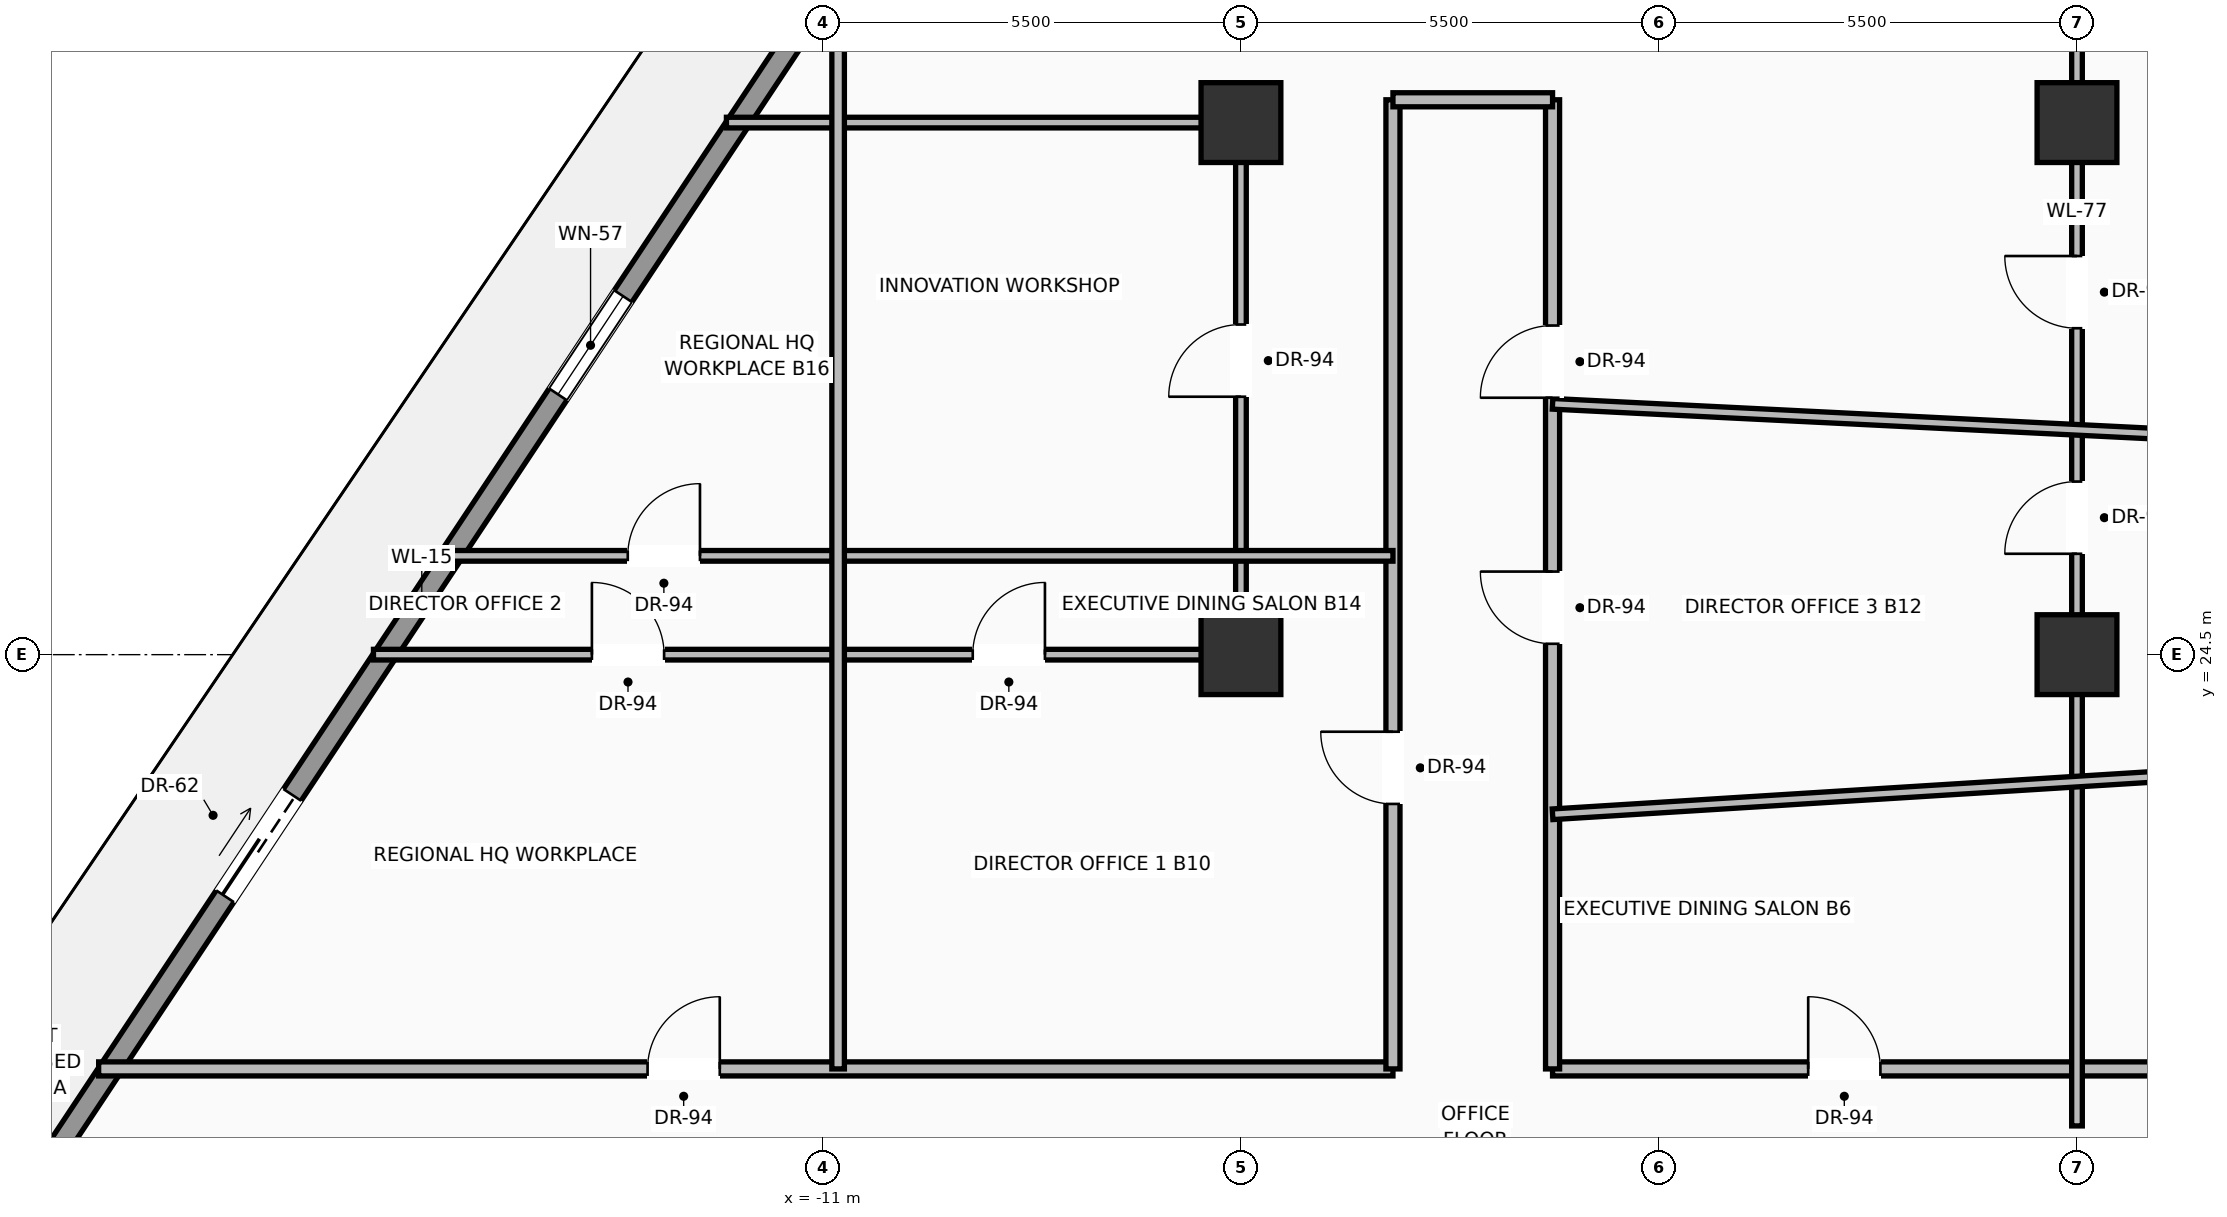
"""IFC4 building model, lengths in metres.
Left out: names, types, materials, properties, quantities, classifications, styles, units other than length and angle.
Written with IfcOpenShell. Run it as: python <this file> out.ifc"""

import sys

from ifc_helpers import new_model, si_unit, direction, frame, frame_2d, origin, origin_2d, place, context, subcontext, project, spatial, rectangle, extrude, source, transform, mapped, element, fill, save


model = new_model("IFC4")
c1 = context("Model", 3, precision=1e-05, world=origin(), true_north=direction((0.0, 1.0)))
c2 = subcontext(c1, "Body", "Model", "MODEL_VIEW")
j1 = project(units=[si_unit("LENGTHUNIT", "METRE"), si_unit("PLANEANGLEUNIT", "RADIAN")], contexts=[c1])
p1 = place(None, origin())
s1 = spatial("IfcSite", under=j1, at=p1, CompositionType="ELEMENT")
p2 = place(p1, origin())
s2 = spatial("IfcBuilding", under=s1, at=p2, CompositionType="ELEMENT")
p3 = place(p2, frame((0.0, 0.0, 117.3)))
s3 = spatial("IfcBuildingStorey", under=s2, at=p3, CompositionType="ELEMENT", Elevation=117.3)
m1 = source(origin(), c2, "Body", "SweptSolid", [
    extrude(rectangle(XDim=1.05, YDim=1.05, at=origin_2d()), origin(), (0.0, 0.0, 1.0), 3.7),
])
for number, where, z_axis, x_axis in (
    (1, (-5.5, 24.5, 0.0), (0.0, 0.0, 1.0), (1.0, 0.0, 0.0)),
    (2, (5.5, 24.5, 0.0), (0.0, 0.0, 1.0), (1.0, 0.0, 0.0)),
    (3, (-5.5, 31.5, 0.0), (0.0, 0.0, 1.0), (1.0, 0.0, 0.0)),
    (4, (5.5, 31.5, 0.0), (0.0, 0.0, 1.0), (1.0, 0.0, 0.0)),
):
    element("IfcColumn", number, at=place(p3, frame(where, z_axis=z_axis, x_axis=x_axis)), inside=s3, PredefinedType="COLUMN", context=c2, shape_type="MappedRepresentation", body=[
        mapped(m1, transform((0.0, 0.0, 0.0), scale=1.0)),
    ])
p4 = place(p3, frame((-21.256, 17.72, 0.0), z_axis=(0.0, 0.0, 1.0), x_axis=(0.552837339674, 0.833289191015, 0.0)))
e5 = element("IfcWall", 5, at=p4, inside=s3, PredefinedType="SOLIDWALL", context=c2, shape_type="SweptSolid", body=[
    extrude(rectangle(XDim=18.009, YDim=0.28, at=frame_2d((9.004, 0.0))), origin(), (0.0, 0.0, 1.0), 3.0),
])
p5 = place(p4, frame((4.322, 0.0, 0.0)))
e6 = element("IfcOpeningElement", 6, at=p5, cuts=e5, PredefinedType="OPENING", context=c2, shape_type="SweptSolid", body=[
    extrude(rectangle(XDim=1.6, YDim=2.35, at=frame_2d((0.8, 1.175))), frame((0.0, 0.15, 0.0), z_axis=(0.0, -1.0, 0.0), x_axis=(1.0, 0.0, 0.0)), (0.0, 0.0, 1.0), 0.3),
])
p6 = place(p4, frame((12.246, 0.0, 0.9)))
e7 = element("IfcOpeningElement", 7, at=p6, cuts=e5, PredefinedType="OPENING", context=c2, shape_type="SweptSolid", body=[
    extrude(rectangle(XDim=1.55, YDim=1.85, at=frame_2d((0.775, 0.925))), frame((0.0, 0.15, 0.0), z_axis=(0.0, -1.0, 0.0), x_axis=(1.0, 0.0, 0.0)), (0.0, 0.0, 1.0), 0.3),
])
p7 = place(p3, frame((-20.529, 19.05, 0.0), z_axis=(0.0, 0.0, 1.0), x_axis=(1.0, 0.0, 0.0)))
e8 = element("IfcWall", 8, at=p7, inside=s3, PredefinedType="PARTITIONING", context=c2, shape_type="SweptSolid", body=[
    extrude(rectangle(XDim=17.029, YDim=0.185, at=frame_2d((8.515, 0.0))), origin(), (0.0, 0.0, 1.0), 2.717),
])
p8 = place(p7, frame((7.222, 0.0, 0.0)))
e9 = element("IfcOpeningElement", 9, at=p8, cuts=e8, PredefinedType="OPENING", context=c2, shape_type="SweptSolid", body=[
    extrude(rectangle(XDim=0.95, YDim=2.2, at=frame_2d((0.475, 1.1))), frame((0.0, 0.103, 0.0), z_axis=(0.0, -1.0, 0.0), x_axis=(1.0, 0.0, 0.0)), (0.0, 0.0, 1.0), 0.205),
])
p9 = place(p3, frame((-1.4, 19.05, 0.0), z_axis=(0.0, 0.0, 1.0), x_axis=(1.0, 0.0, 0.0)))
e10 = element("IfcWall", 10, at=p9, inside=s3, PredefinedType="PARTITIONING", context=c2, shape_type="SweptSolid", body=[
    extrude(rectangle(XDim=22.357, YDim=0.185, at=frame_2d((11.179, 0.0))), origin(), (0.0, 0.0, 1.0), 2.717),
])
p10 = place(p9, frame((12.715, 0.0, 0.0)))
e11 = element("IfcOpeningElement", 11, at=p10, cuts=e10, PredefinedType="OPENING", context=c2, shape_type="SweptSolid", body=[
    extrude(rectangle(XDim=0.95, YDim=2.2, at=frame_2d((0.475, 1.1))), frame((0.0, 0.103, 0.0), z_axis=(0.0, -1.0, 0.0), x_axis=(1.0, 0.0, 0.0)), (0.0, 0.0, 1.0), 0.205),
])
p11 = place(p9, frame((3.363, 0.0, 0.0)))
e12 = element("IfcOpeningElement", 12, at=p11, cuts=e10, PredefinedType="OPENING", context=c2, shape_type="SweptSolid", body=[
    extrude(rectangle(XDim=0.95, YDim=2.2, at=frame_2d((0.475, 1.1))), frame((0.0, 0.103, 0.0), z_axis=(0.0, -1.0, 0.0), x_axis=(1.0, 0.0, 0.0)), (0.0, 0.0, 1.0), 0.205),
])
p12 = place(p9, frame((9.021, 0.0, 0.0)))
e13 = element("IfcOpeningElement", 13, at=p12, cuts=e10, PredefinedType="OPENING", context=c2, shape_type="SweptSolid", body=[
    extrude(rectangle(XDim=0.95, YDim=2.2, at=frame_2d((0.475, 1.1))), frame((0.0, 0.103, 0.0), z_axis=(0.0, -1.0, 0.0), x_axis=(1.0, 0.0, 0.0)), (0.0, 0.0, 1.0), 0.205),
])
p13 = place(p3, frame((-3.5, 19.05, 0.0), z_axis=(0.0, 0.0, 1.0), x_axis=(0.0, 1.0, 0.0)))
e14 = element("IfcWall", 14, at=p13, inside=s3, PredefinedType="PARTITIONING", context=c2, shape_type="SweptSolid", body=[
    extrude(rectangle(XDim=12.75, YDim=0.185, at=frame_2d((6.375, 0.0))), origin(), (0.0, 0.0, 1.0), 2.717),
])
p14 = place(p13, frame((3.486, 0.0, 0.0)))
e15 = element("IfcOpeningElement", 15, at=p14, cuts=e14, PredefinedType="OPENING", context=c2, shape_type="SweptSolid", body=[
    extrude(rectangle(XDim=0.95, YDim=2.2, at=frame_2d((0.475, 1.1))), frame((0.0, 0.103, 0.0), z_axis=(0.0, -1.0, 0.0), x_axis=(1.0, 0.0, 0.0)), (0.0, 0.0, 1.0), 0.205),
])
p15 = place(p3, frame((-1.4, 19.05, 0.0), z_axis=(0.0, 0.0, 1.0), x_axis=(0.0, 1.0, 0.0)))
e16 = element("IfcWall", 16, at=p15, inside=s3, PredefinedType="PARTITIONING", context=c2, shape_type="SweptSolid", body=[
    extrude(rectangle(XDim=12.75, YDim=0.185, at=frame_2d((6.375, 0.0))), origin(), (0.0, 0.0, 1.0), 2.717),
])
p16 = place(p15, frame((8.83, 0.0, 0.0)))
e17 = element("IfcOpeningElement", 17, at=p16, cuts=e16, PredefinedType="OPENING", context=c2, shape_type="SweptSolid", body=[
    extrude(rectangle(XDim=0.95, YDim=2.2, at=frame_2d((0.475, 1.1))), frame((0.0, 0.103, 0.0), z_axis=(0.0, -1.0, 0.0), x_axis=(1.0, 0.0, 0.0)), (0.0, 0.0, 1.0), 0.205),
])
p17 = place(p15, frame((5.593, 0.0, 0.0)))
e18 = element("IfcOpeningElement", 18, at=p17, cuts=e16, PredefinedType="OPENING", context=c2, shape_type="SweptSolid", body=[
    extrude(rectangle(XDim=0.95, YDim=2.2, at=frame_2d((0.475, 1.1))), frame((0.0, 0.103, 0.0), z_axis=(0.0, -1.0, 0.0), x_axis=(1.0, 0.0, 0.0)), (0.0, 0.0, 1.0), 0.205),
])
p18 = place(p3, frame((-3.5, 31.8, 0.0), z_axis=(0.0, 0.0, 1.0), x_axis=(1.0, 0.0, 0.0)))
e19 = element("IfcWall", 19, at=p18, inside=s3, PredefinedType="PARTITIONING", context=c2, shape_type="SweptSolid", body=[
    extrude(rectangle(XDim=2.1, YDim=0.185, at=frame_2d((1.05, 0.0))), origin(), (0.0, 0.0, 1.0), 2.717),
])
p19 = place(p3, frame((5.5, 18.3, 0.0), z_axis=(0.0, 0.0, 1.0), x_axis=(0.0, 1.0, 0.0)))
e20 = element("IfcWall", 20, at=p19, inside=s3, PredefinedType="PARTITIONING", context=c2, shape_type="SweptSolid", body=[
    extrude(rectangle(XDim=24.043, YDim=0.14, at=frame_2d((12.022, 0.0))), origin(), (0.0, 0.0, 1.0), 2.717),
])
p20 = place(p19, frame((10.494, 0.0, 0.0)))
e21 = element("IfcOpeningElement", 21, at=p20, cuts=e20, PredefinedType="OPENING", context=c2, shape_type="SweptSolid", body=[
    extrude(rectangle(XDim=0.95, YDim=2.2, at=frame_2d((0.475, 1.1))), frame((0.0, 0.08, 0.0), z_axis=(0.0, -1.0, 0.0), x_axis=(1.0, 0.0, 0.0)), (0.0, 0.0, 1.0), 0.16),
])
p21 = place(p19, frame((18.555, 0.0, 0.0)))
e22 = element("IfcOpeningElement", 22, at=p21, cuts=e20, PredefinedType="OPENING", context=c2, shape_type="SweptSolid", body=[
    extrude(rectangle(XDim=0.95, YDim=2.2, at=frame_2d((0.475, 1.1))), frame((0.0, 0.08, 0.0), z_axis=(0.0, -1.0, 0.0), x_axis=(1.0, 0.0, 0.0)), (0.0, 0.0, 1.0), 0.16),
])
p22 = place(p19, frame((7.527, 0.0, 0.0)))
e23 = element("IfcOpeningElement", 23, at=p22, cuts=e20, PredefinedType="OPENING", context=c2, shape_type="SweptSolid", body=[
    extrude(rectangle(XDim=0.95, YDim=2.2, at=frame_2d((0.475, 1.1))), frame((0.0, 0.08, 0.0), z_axis=(0.0, -1.0, 0.0), x_axis=(1.0, 0.0, 0.0)), (0.0, 0.0, 1.0), 0.16),
])
p23 = place(p3, frame((-16.914, 24.5, 0.0), z_axis=(0.0, 0.0, 1.0), x_axis=(1.0, 0.0, 0.0)))
e24 = element("IfcWall", 24, at=p23, inside=s3, PredefinedType="PARTITIONING", context=c2, shape_type="SweptSolid", body=[
    extrude(rectangle(XDim=11.414, YDim=0.14, at=frame_2d((5.707, 0.0))), origin(), (0.0, 0.0, 1.0), 2.717),
])
p24 = place(p23, frame((2.874, 0.0, 0.0)))
e25 = element("IfcOpeningElement", 25, at=p24, cuts=e24, PredefinedType="OPENING", context=c2, shape_type="SweptSolid", body=[
    extrude(rectangle(XDim=0.95, YDim=2.2, at=frame_2d((0.475, 1.1))), frame((0.0, 0.08, 0.0), z_axis=(0.0, -1.0, 0.0), x_axis=(1.0, 0.0, 0.0)), (0.0, 0.0, 1.0), 0.16),
])
p25 = place(p23, frame((7.885, 0.0, 0.0)))
e26 = element("IfcOpeningElement", 26, at=p25, cuts=e24, PredefinedType="OPENING", context=c2, shape_type="SweptSolid", body=[
    extrude(rectangle(XDim=0.95, YDim=2.2, at=frame_2d((0.475, 1.1))), frame((0.0, 0.08, 0.0), z_axis=(0.0, -1.0, 0.0), x_axis=(1.0, 0.0, 0.0)), (0.0, 0.0, 1.0), 0.16),
])
p26 = place(p3, frame((-5.5, 24.5, 0.0), z_axis=(0.0, 0.0, 1.0), x_axis=(0.0, 1.0, 0.0)))
e27 = element("IfcWall", 27, at=p26, inside=s3, PredefinedType="PARTITIONING", context=c2, shape_type="SweptSolid", body=[
    extrude(rectangle(XDim=7.0, YDim=0.14, at=frame_2d((3.5, 0.0))), origin(), (0.0, 0.0, 1.0), 2.717),
])
p27 = place(p26, frame((3.393, 0.0, 0.0)))
e28 = element("IfcOpeningElement", 28, at=p27, cuts=e27, PredefinedType="OPENING", context=c2, shape_type="SweptSolid", body=[
    extrude(rectangle(XDim=0.95, YDim=2.2, at=frame_2d((0.475, 1.1))), frame((0.0, 0.08, 0.0), z_axis=(0.0, -1.0, 0.0), x_axis=(1.0, 0.0, 0.0)), (0.0, 0.0, 1.0), 0.16),
])
p28 = place(p3, frame((-12.27, 31.5, 0.0), z_axis=(0.0, 0.0, 1.0), x_axis=(1.0, 0.0, 0.0)))
e29 = element("IfcWall", 29, at=p28, inside=s3, PredefinedType="PARTITIONING", context=c2, shape_type="SweptSolid", body=[
    extrude(rectangle(XDim=6.77, YDim=0.14, at=frame_2d((3.385, 0.0))), origin(), (0.0, 0.0, 1.0), 2.717),
])
p29 = place(p3, frame((-16.051, 25.8, 0.0), z_axis=(0.0, 0.0, 1.0), x_axis=(1.0, 0.0, 0.0)))
e30 = element("IfcWall", 30, at=p29, inside=s3, PredefinedType="PARTITIONING", context=c2, shape_type="SweptSolid", body=[
    extrude(rectangle(XDim=12.551, YDim=0.14, at=frame_2d((6.275, 0.0))), origin(), (0.0, 0.0, 1.0), 2.717),
])
p30 = place(p29, frame((2.483, 0.0, 0.0)))
e31 = element("IfcOpeningElement", 31, at=p30, cuts=e30, PredefinedType="OPENING", context=c2, shape_type="SweptSolid", body=[
    extrude(rectangle(XDim=0.95, YDim=2.2, at=frame_2d((0.475, 1.1))), frame((0.0, 0.08, 0.0), z_axis=(0.0, -1.0, 0.0), x_axis=(1.0, 0.0, 0.0)), (0.0, 0.0, 1.0), 0.16),
])
p31 = place(p3, frame((-1.4, 22.4, 0.0), z_axis=(0.0, 0.0, 1.0), x_axis=(0.998063588678, 0.062201872609, 0.0)))
e32 = element("IfcWall", 32, at=p31, inside=s3, PredefinedType="PARTITIONING", context=c2, shape_type="SweptSolid", body=[
    extrude(rectangle(XDim=19.472, YDim=0.14, at=frame_2d((9.736, 0.0))), origin(), (0.0, 0.0, 1.0), 2.717),
])
p32 = place(p31, frame((14.938, 0.0, 0.0)))
e33 = element("IfcOpeningElement", 33, at=p32, cuts=e32, PredefinedType="OPENING", context=c2, shape_type="SweptSolid", body=[
    extrude(rectangle(XDim=0.95, YDim=2.2, at=frame_2d((0.475, 1.1))), frame((0.0, 0.08, 0.0), z_axis=(0.0, -1.0, 0.0), x_axis=(1.0, 0.0, 0.0)), (0.0, 0.0, 1.0), 0.16),
])
p33 = place(p3, frame((-1.4, 27.8, 0.0), z_axis=(0.0, 0.0, 1.0), x_axis=(0.998773235939, -0.049517907586, 0.0)))
e34 = element("IfcWall", 34, at=p33, inside=s3, PredefinedType="PARTITIONING", context=c2, shape_type="SweptSolid", body=[
    extrude(rectangle(XDim=17.32, YDim=0.14, at=frame_2d((8.66, 0.0))), origin(), (0.0, 0.0, 1.0), 2.717),
])
p34 = place(p33, frame((13.812, 0.0, 0.0)))
e35 = element("IfcOpeningElement", 35, at=p34, cuts=e34, PredefinedType="OPENING", context=c2, shape_type="SweptSolid", body=[
    extrude(rectangle(XDim=0.95, YDim=2.2, at=frame_2d((0.475, 1.1))), frame((0.0, 0.08, 0.0), z_axis=(0.0, -1.0, 0.0), x_axis=(1.0, 0.0, 0.0)), (0.0, 0.0, 1.0), 0.16),
])
p35 = place(p3, frame((-10.8, 19.05, 0.0), z_axis=(0.0, 0.0, 1.0), x_axis=(0.0, 1.0, 0.0)))
e36 = element("IfcWall", 36, at=p35, inside=s3, PredefinedType="PARTITIONING", context=c2, shape_type="SweptSolid", body=[
    extrude(rectangle(XDim=14.665, YDim=0.165, at=frame_2d((7.333, 0.0))), origin(), (0.0, 0.0, 1.0), 2.717),
])
m2 = source(origin(), c2, "Body", "SweptSolid", [
    extrude(rectangle(XDim=1.6, YDim=2.35, at=frame_2d((0.8, 1.175))), frame((0.0, 0.025, 0.0), z_axis=(0.0, -1.0, 0.0), x_axis=(1.0, 0.0, 0.0)), (0.0, 0.0, 1.0), 0.05),
])
p36 = place(p5, origin())
e37 = element("IfcDoor", 37, at=p36, inside=s3, OperationType="SLIDING_TO_LEFT", PredefinedType="DOOR", context=c2, shape_type="MappedRepresentation", body=[
    mapped(m2, transform((0.0, 0.0, 0.0), scale=1.0)),
])
fill(e6, e37)
m3 = source(origin(), c2, "Body", "SweptSolid", [
    extrude(rectangle(XDim=1.55, YDim=1.85, at=frame_2d((0.775, 0.925))), frame((0.0, 0.03, 0.0), z_axis=(0.0, -1.0, 0.0), x_axis=(1.0, 0.0, 0.0)), (0.0, 0.0, 1.0), 0.06),
])
p37 = place(p6, origin())
e38 = element("IfcWindow", 38, at=p37, inside=s3, PartitioningType="SINGLE_PANEL", PredefinedType="WINDOW", context=c2, shape_type="MappedRepresentation", body=[
    mapped(m3, transform((0.0, 0.0, 0.0), scale=1.0)),
])
fill(e7, e38)
m4 = source(origin(), c2, "Body", "SweptSolid", [
    extrude(rectangle(XDim=0.95, YDim=2.2, at=frame_2d((0.475, 1.1))), frame((0.0, 0.025, 0.0), z_axis=(0.0, -1.0, 0.0), x_axis=(1.0, 0.0, 0.0)), (0.0, 0.0, 1.0), 0.05),
])
p38 = place(p8, origin())
e39 = element("IfcDoor", 39, at=p38, inside=s3, OperationType="SINGLE_SWING_RIGHT", PredefinedType="DOOR", context=c2, shape_type="MappedRepresentation", body=[
    mapped(m4, transform((0.0, 0.0, 0.0), scale=1.0)),
])
fill(e9, e39)
p39 = place(p14, origin())
e40 = element("IfcDoor", 40, at=p39, inside=s3, OperationType="SINGLE_SWING_RIGHT", PredefinedType="DOOR", context=c2, shape_type="MappedRepresentation", body=[
    mapped(m4, transform((0.0, 0.0, 0.0), scale=1.0)),
])
fill(e15, e40)
p40 = place(p16, origin())
e41 = element("IfcDoor", 41, at=p40, inside=s3, OperationType="SINGLE_SWING_LEFT", PredefinedType="DOOR", context=c2, shape_type="MappedRepresentation", body=[
    mapped(m4, transform((0.0, 0.0, 0.0), scale=1.0)),
])
fill(e17, e41)
p41 = place(p11, origin())
e42 = element("IfcDoor", 42, at=p41, inside=s3, OperationType="SINGLE_SWING_LEFT", PredefinedType="DOOR", context=c2, shape_type="MappedRepresentation", body=[
    mapped(m4, transform((0.0, 0.0, 0.0), scale=1.0)),
])
fill(e12, e42)
p42 = place(p17, origin())
e43 = element("IfcDoor", 43, at=p42, inside=s3, OperationType="SINGLE_SWING_RIGHT", PredefinedType="DOOR", context=c2, shape_type="MappedRepresentation", body=[
    mapped(m4, transform((0.0, 0.0, 0.0), scale=1.0)),
])
fill(e18, e43)
p43 = place(p24, origin())
e44 = element("IfcDoor", 44, at=p43, inside=s3, OperationType="SINGLE_SWING_LEFT", PredefinedType="DOOR", context=c2, shape_type="MappedRepresentation", body=[
    mapped(m4, transform((0.0, 0.0, 0.0), scale=1.0)),
])
fill(e25, e44)
p44 = place(p25, origin())
e45 = element("IfcDoor", 45, at=p44, inside=s3, OperationType="SINGLE_SWING_RIGHT", PredefinedType="DOOR", context=c2, shape_type="MappedRepresentation", body=[
    mapped(m4, transform((0.0, 0.0, 0.0), scale=1.0)),
])
fill(e26, e45)
p45 = place(p27, origin())
e46 = element("IfcDoor", 46, at=p45, inside=s3, OperationType="SINGLE_SWING_LEFT", PredefinedType="DOOR", context=c2, shape_type="MappedRepresentation", body=[
    mapped(m4, transform((0.0, 0.0, 0.0), scale=1.0)),
])
fill(e28, e46)
p46 = place(p20, origin())
e47 = element("IfcDoor", 47, at=p46, inside=s3, OperationType="SINGLE_SWING_RIGHT", PredefinedType="DOOR", context=c2, shape_type="MappedRepresentation", body=[
    mapped(m4, transform((0.0, 0.0, 0.0), scale=1.0)),
])
fill(e21, e47)
p47 = place(p22, origin())
e48 = element("IfcDoor", 48, at=p47, inside=s3, OperationType="SINGLE_SWING_LEFT", PredefinedType="DOOR", context=c2, shape_type="MappedRepresentation", body=[
    mapped(m4, transform((0.0, 0.0, 0.0), scale=1.0)),
])
fill(e23, e48)
p48 = place(p30, origin())
e49 = element("IfcDoor", 49, at=p48, inside=s3, OperationType="SINGLE_SWING_RIGHT", PredefinedType="DOOR", context=c2, shape_type="MappedRepresentation", body=[
    mapped(m4, transform((0.0, 0.0, 0.0), scale=1.0)),
])
fill(e31, e49)
save(model, sys.argv[1])
